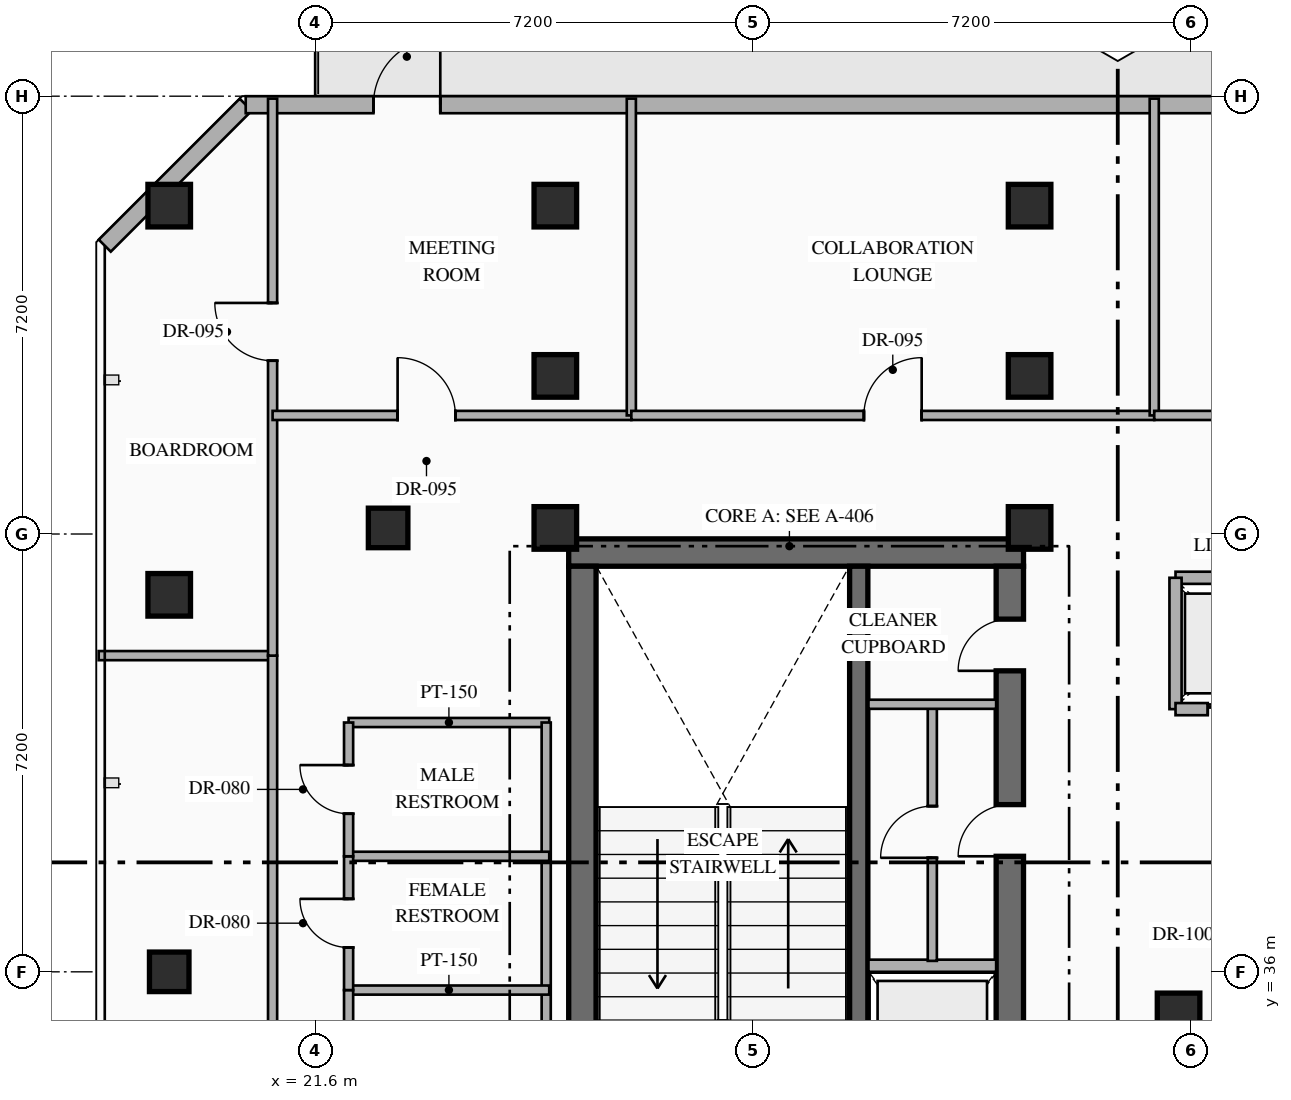
"""IFC4 building model, lengths in metres.
Left out: names, types, materials, properties, quantities, classifications, styles, units other than length and angle.
Written with IfcOpenShell. Run it as: python <this file> out.ifc"""

import sys

from ifc_helpers import new_model, si_unit, direction, frame, frame_2d, origin, origin_2d, place, context, subcontext, project, spatial, rectangle, hollow_rectangle, extrude, element, fill, save


model = new_model("IFC4")
c1 = context("Model", 3, precision=1e-05, world=origin(), true_north=direction((0.0, 1.0)))
c2 = subcontext(c1, "Body", "Model", "MODEL_VIEW")
j1 = project(units=[si_unit("LENGTHUNIT", "METRE"), si_unit("PLANEANGLEUNIT", "RADIAN")], contexts=[c1])
p1 = place(None, origin())
s1 = spatial("IfcSite", under=j1, at=p1, CompositionType="ELEMENT")
p2 = place(p1, origin())
s2 = spatial("IfcBuilding", under=s1, at=p2, CompositionType="ELEMENT")
p3 = place(p2, frame((0.0, 0.0, 231.15)))
s3 = spatial("IfcBuildingStorey", under=s2, at=p3, CompositionType="ELEMENT", Elevation=231.15)
p4 = place(p3, frame((25.77, 42.895, 0.0), z_axis=(0.0, 0.0, 1.0), x_axis=(1.0, 0.0, 0.0)))
e1 = element("IfcWall", 1, at=p4, inside=s3, PredefinedType="SHEAR", context=c2, shape_type="SweptSolid", body=[
    extrude(rectangle(XDim=7.48, YDim=0.45, at=frame_2d((3.74, 0.0))), origin(), (0.0, 0.0, 1.0), 3.6),
])
p5 = place(p3, frame((25.995, 33.19, 0.0), z_axis=(0.0, 0.0, 1.0), x_axis=(0.0, 1.0, 0.0)))
e2 = element("IfcWall", 2, at=p5, inside=s3, PredefinedType="SHEAR", context=c2, shape_type="SweptSolid", body=[
    extrude(rectangle(XDim=9.48, YDim=0.45, at=frame_2d((4.74, 0.0))), origin(), (0.0, 0.0, 1.0), 3.6),
])
p6 = place(p3, frame((33.025, 33.19, 0.0), z_axis=(0.0, 0.0, 1.0), x_axis=(0.0, 1.0, 0.0)))
e3 = element("IfcWall", 3, at=p6, inside=s3, PredefinedType="SHEAR", context=c2, shape_type="SweptSolid", body=[
    extrude(rectangle(XDim=9.48, YDim=0.45, at=frame_2d((4.74, 0.0))), origin(), (0.0, 0.0, 1.0), 3.6),
])
p7 = place(p6, frame((4.71, 0.0, 0.0)))
e4 = element("IfcOpeningElement", 4, at=p7, cuts=e3, PredefinedType="OPENING", context=c2, shape_type="SweptSolid", body=[
    extrude(rectangle(XDim=0.85, YDim=2.08, at=frame_2d((0.425, 1.04))), frame((0.0, 0.235, 0.0), z_axis=(0.0, -1.0, 0.0), x_axis=(1.0, 0.0, 0.0)), (0.0, 0.0, 1.0), 0.47),
])
p8 = place(p6, frame((7.76, 0.0, 0.0)))
e5 = element("IfcOpeningElement", 5, at=p8, cuts=e3, PredefinedType="OPENING", context=c2, shape_type="SweptSolid", body=[
    extrude(rectangle(XDim=0.85, YDim=2.08, at=frame_2d((0.425, 1.04))), frame((0.0, 0.235, 0.0), z_axis=(0.0, -1.0, 0.0), x_axis=(1.0, 0.0, 0.0)), (0.0, 0.0, 1.0), 0.47),
])
p9 = place(p3, frame((30.54, 33.19, 0.0), z_axis=(0.0, 0.0, 1.0), x_axis=(0.0, 1.0, 0.0)))
e6 = element("IfcWall", 6, at=p9, inside=s3, PredefinedType="SHEAR", context=c2, shape_type="SweptSolid", body=[
    extrude(rectangle(XDim=9.48, YDim=0.3, at=frame_2d((4.74, 0.0))), origin(), (0.0, 0.0, 1.0), 3.6),
])
for number, where, z_axis, x_axis in (
    (7, (25.55, 43.3, 0.0), (0.0, 0.0, 1.0), (1.0, 0.0, 0.0)),
    (8, (33.35, 43.3, 0.0), (0.0, 0.0, 1.0), (1.0, 0.0, 0.0)),
    (9, (35.8, 35.3, 0.0), (0.0, 0.0, 1.0), (1.0, 0.0, 0.0)),
    (10, (25.55, 45.8, 0.0), (0.0, 0.0, 1.0), (1.0, 0.0, 0.0)),
    (11, (33.35, 45.8, 0.0), (0.0, 0.0, 1.0), (1.0, 0.0, 0.0)),
    (12, (19.2, 48.6, 0.0), (0.0, 0.0, 1.0), (1.0, 0.0, 0.0)),
    (13, (25.55, 48.6, 0.0), (0.0, 0.0, 1.0), (1.0, 0.0, 0.0)),
    (14, (33.35, 48.6, 0.0), (0.0, 0.0, 1.0), (1.0, 0.0, 0.0)),
    (15, (19.2, 42.2, 0.0), (0.0, 0.0, 1.0), (1.0, 0.0, 0.0)),
):
    element("IfcColumn", number, at=place(p3, frame(where, z_axis=z_axis, x_axis=x_axis)), inside=s3, PredefinedType="COLUMN", context=c2, shape_type="SweptSolid", body=[
        extrude(hollow_rectangle(XDim=0.7, YDim=0.7, WallThickness=0.028, at=origin_2d()), origin(), (0.0, 0.0, 1.0), 3.6),
    ])
for number, where, z_axis, x_axis in (
    (16, (22.8, 43.3, 0.0), (0.0, 0.0, 1.0), (1.0, 0.0, 0.0)),
    (17, (19.2, 36.0, 0.0), (0.0, 0.0, 1.0), (1.0, 0.0, 0.0)),
):
    element("IfcColumn", number, at=place(p3, frame(where, z_axis=z_axis, x_axis=x_axis)), inside=s3, PredefinedType="COLUMN", context=c2, shape_type="SweptSolid", body=[
        extrude(hollow_rectangle(XDim=0.65, YDim=0.65, WallThickness=0.025, at=origin_2d()), origin(), (0.0, 0.0, 1.0), 3.6),
    ])
p10 = place(p3, frame((18.14, 47.942, 0.0), z_axis=(0.0, 0.0, 1.0), x_axis=(0.707106781187, 0.707106781187, 0.0)))
e18 = element("IfcWall", 18, at=p10, inside=s3, PredefinedType="STANDARD", context=c2, shape_type="SweptSolid", body=[
    extrude(rectangle(XDim=3.278, YDim=0.28, at=frame_2d((1.639, 0.0))), origin(), (0.0, 0.0, 1.0), 3.3),
])
p11 = place(p3, frame((20.458, 50.26, 0.0), z_axis=(0.0, 0.0, 1.0), x_axis=(1.0, 0.0, 0.0)))
e19 = element("IfcWall", 19, at=p11, inside=s3, PredefinedType="STANDARD", context=c2, shape_type="SweptSolid", body=[
    extrude(rectangle(XDim=22.084, YDim=0.28, at=frame_2d((11.042, 0.0))), origin(), (0.0, 0.0, 1.0), 3.3),
])
p12 = place(p11, frame((2.1, 0.0, 0.0)))
e20 = element("IfcOpeningElement", 20, at=p12, cuts=e19, PredefinedType="OPENING", context=c2, shape_type="SweptSolid", body=[
    extrude(rectangle(XDim=1.1, YDim=2.2, at=frame_2d((0.55, 1.1))), frame((0.0, 0.15, 0.0), z_axis=(0.0, -1.0, 0.0), x_axis=(1.0, 0.0, 0.0)), (0.0, 0.0, 1.0), 0.3),
])
p13 = place(p3, frame((30.7, 36.1, 0.0), z_axis=(0.0, 0.0, 1.0), x_axis=(1.0, 0.0, 0.0)))
e21 = element("IfcWall", 21, at=p13, inside=s3, PredefinedType="STANDARD", context=c2, shape_type="SweptSolid", body=[
    extrude(rectangle(XDim=2.1, YDim=0.2, at=frame_2d((1.05, 0.0))), origin(), (0.0, 0.0, 1.0), 3.3),
])
p14 = place(p3, frame((31.75, 36.18, 0.0), z_axis=(0.0, 0.0, 1.0), x_axis=(0.0, 1.0, 0.0)))
e22 = element("IfcWall", 22, at=p14, inside=s3, PredefinedType="PARTITIONING", context=c2, shape_type="SweptSolid", body=[
    extrude(rectangle(XDim=4.24, YDim=0.15, at=frame_2d((2.12, 0.0))), origin(), (0.0, 0.0, 1.0), 3.3),
])
p15 = place(p14, frame((1.695, 0.0, 0.0)))
e23 = element("IfcOpeningElement", 23, at=p15, cuts=e22, PredefinedType="OPENING", context=c2, shape_type="SweptSolid", body=[
    extrude(rectangle(XDim=0.85, YDim=2.08, at=frame_2d((0.425, 1.04))), frame((0.0, 0.085, 0.0), z_axis=(0.0, -1.0, 0.0), x_axis=(1.0, 0.0, 0.0)), (0.0, 0.0, 1.0), 0.17),
])
p16 = place(p3, frame((30.7, 40.4, 0.0), z_axis=(0.0, 0.0, 1.0), x_axis=(1.0, 0.0, 0.0)))
e24 = element("IfcWall", 24, at=p16, inside=s3, PredefinedType="PARTITIONING", context=c2, shape_type="SweptSolid", body=[
    extrude(rectangle(XDim=2.1, YDim=0.15, at=frame_2d((1.05, 0.0))), origin(), (0.0, 0.0, 1.0), 3.3),
])
p17 = place(p3, frame((35.75, 42.48, 0.0), z_axis=(0.0, 0.0, 1.0), x_axis=(1.0, 0.0, 0.0)))
e25 = element("IfcWall", 25, at=p17, inside=s3, PredefinedType="STANDARD", context=c2, shape_type="SweptSolid", body=[
    extrude(rectangle(XDim=9.11, YDim=0.2, at=frame_2d((4.555, 0.0))), origin(), (0.0, 0.0, 1.0), 3.3),
])
p18 = place(p3, frame((35.75, 40.32, 0.0), z_axis=(0.0, 0.0, 1.0), x_axis=(0.0, 1.0, 0.0)))
e26 = element("IfcWall", 26, at=p18, inside=s3, PredefinedType="STANDARD", context=c2, shape_type="SweptSolid", body=[
    extrude(rectangle(XDim=2.16, YDim=0.2, at=frame_2d((1.08, 0.0))), origin(), (0.0, 0.0, 1.0), 3.3),
])
p19 = place(p3, frame((35.75, 40.32, 0.0), z_axis=(0.0, 0.0, 1.0), x_axis=(1.0, 0.0, 0.0)))
e27 = element("IfcWall", 27, at=p19, inside=s3, PredefinedType="STANDARD", context=c2, shape_type="SweptSolid", body=[
    extrude(rectangle(XDim=9.11, YDim=0.2, at=frame_2d((4.555, 0.0))), origin(), (0.0, 0.0, 1.0), 3.3),
])
p20 = place(p19, frame((0.53, 0.0, 0.0)))
e28 = element("IfcOpeningElement", 28, at=p20, cuts=e27, PredefinedType="OPENING", context=c2, shape_type="SweptSolid", body=[
    extrude(rectangle(XDim=1.1, YDim=2.18, at=frame_2d((0.55, 1.09))), frame((0.0, 0.11, 0.0), z_axis=(0.0, -1.0, 0.0), x_axis=(1.0, 0.0, 0.0)), (0.0, 0.0, 1.0), 0.22),
])
p21 = place(p19, frame((2.73, 0.0, 0.0)))
e29 = element("IfcOpeningElement", 29, at=p21, cuts=e27, PredefinedType="OPENING", context=c2, shape_type="SweptSolid", body=[
    extrude(rectangle(XDim=1.1, YDim=2.18, at=frame_2d((0.55, 1.09))), frame((0.0, 0.11, 0.0), z_axis=(0.0, -1.0, 0.0), x_axis=(1.0, 0.0, 0.0)), (0.0, 0.0, 1.0), 0.22),
])
p22 = place(p19, frame((4.93, 0.0, 0.0)))
e30 = element("IfcOpeningElement", 30, at=p22, cuts=e27, PredefinedType="OPENING", context=c2, shape_type="SweptSolid", body=[
    extrude(rectangle(XDim=1.1, YDim=2.18, at=frame_2d((0.55, 1.09))), frame((0.0, 0.11, 0.0), z_axis=(0.0, -1.0, 0.0), x_axis=(1.0, 0.0, 0.0)), (0.0, 0.0, 1.0), 0.22),
])
p23 = place(p19, frame((7.13, 0.0, 0.0)))
e31 = element("IfcOpeningElement", 31, at=p23, cuts=e27, PredefinedType="OPENING", context=c2, shape_type="SweptSolid", body=[
    extrude(rectangle(XDim=1.1, YDim=2.18, at=frame_2d((0.55, 1.09))), frame((0.0, 0.11, 0.0), z_axis=(0.0, -1.0, 0.0), x_axis=(1.0, 0.0, 0.0)), (0.0, 0.0, 1.0), 0.22),
])
p24 = place(p3, frame((22.15, 40.1, 0.0), z_axis=(0.0, 0.0, 1.0), x_axis=(1.0, 0.0, 0.0)))
e32 = element("IfcWall", 32, at=p24, inside=s3, PredefinedType="PARTITIONING", context=c2, shape_type="SweptSolid", body=[
    extrude(rectangle(XDim=3.3, YDim=0.15, at=frame_2d((1.65, 0.0))), origin(), (0.0, 0.0, 1.0), 3.3),
])
p25 = place(p3, frame((25.4, 33.5, 0.0), z_axis=(0.0, 0.0, 1.0), x_axis=(0.0, 1.0, 0.0)))
e33 = element("IfcWall", 33, at=p25, inside=s3, PredefinedType="PARTITIONING", context=c2, shape_type="SweptSolid", body=[
    extrude(rectangle(XDim=6.6, YDim=0.15, at=frame_2d((3.3, 0.0))), origin(), (0.0, 0.0, 1.0), 3.3),
])
for number, where, z_axis, x_axis in (
    (34, (22.15, 35.7, 0.0), (0.0, 0.0, 1.0), (1.0, 0.0, 0.0)),
    (35, (22.15, 37.9, 0.0), (0.0, 0.0, 1.0), (1.0, 0.0, 0.0)),
):
    element("IfcWall", number, at=place(p3, frame(where, z_axis=z_axis, x_axis=x_axis)), inside=s3, PredefinedType="PARTITIONING", context=c2, shape_type="SweptSolid", body=[
        extrude(rectangle(XDim=3.3, YDim=0.15, at=frame_2d((1.65, 0.0))), origin(), (0.0, 0.0, 1.0), 3.3),
    ])
p26 = place(p3, frame((22.15, 33.5, 0.0), z_axis=(0.0, 0.0, 1.0), x_axis=(0.0, 1.0, 0.0)))
e36 = element("IfcWall", 36, at=p26, inside=s3, PredefinedType="PARTITIONING", context=c2, shape_type="SweptSolid", body=[
    extrude(rectangle(XDim=2.2, YDim=0.15, at=frame_2d((1.1, 0.0))), origin(), (0.0, 0.0, 1.0), 3.3),
])
p27 = place(p26, frame((0.7, 0.0, 0.0)))
e37 = element("IfcOpeningElement", 37, at=p27, cuts=e36, PredefinedType="OPENING", context=c2, shape_type="SweptSolid", body=[
    extrude(rectangle(XDim=0.8, YDim=2.06, at=frame_2d((0.4, 1.03))), frame((0.0, 0.085, 0.0), z_axis=(0.0, -1.0, 0.0), x_axis=(1.0, 0.0, 0.0)), (0.0, 0.0, 1.0), 0.17),
])
p28 = place(p3, frame((22.15, 35.7, 0.0), z_axis=(0.0, 0.0, 1.0), x_axis=(0.0, 1.0, 0.0)))
e38 = element("IfcWall", 38, at=p28, inside=s3, PredefinedType="PARTITIONING", context=c2, shape_type="SweptSolid", body=[
    extrude(rectangle(XDim=2.2, YDim=0.15, at=frame_2d((1.1, 0.0))), origin(), (0.0, 0.0, 1.0), 3.3),
])
p29 = place(p28, frame((0.7, 0.0, 0.0)))
e39 = element("IfcOpeningElement", 39, at=p29, cuts=e38, PredefinedType="OPENING", context=c2, shape_type="SweptSolid", body=[
    extrude(rectangle(XDim=0.8, YDim=2.06, at=frame_2d((0.4, 1.03))), frame((0.0, 0.085, 0.0), z_axis=(0.0, -1.0, 0.0), x_axis=(1.0, 0.0, 0.0)), (0.0, 0.0, 1.0), 0.17),
])
p30 = place(p3, frame((22.15, 37.9, 0.0), z_axis=(0.0, 0.0, 1.0), x_axis=(0.0, 1.0, 0.0)))
e40 = element("IfcWall", 40, at=p30, inside=s3, PredefinedType="PARTITIONING", context=c2, shape_type="SweptSolid", body=[
    extrude(rectangle(XDim=2.2, YDim=0.15, at=frame_2d((1.1, 0.0))), origin(), (0.0, 0.0, 1.0), 3.3),
])
p31 = place(p30, frame((0.7, 0.0, 0.0)))
e41 = element("IfcOpeningElement", 41, at=p31, cuts=e40, PredefinedType="OPENING", context=c2, shape_type="SweptSolid", body=[
    extrude(rectangle(XDim=0.8, YDim=2.06, at=frame_2d((0.4, 1.03))), frame((0.0, 0.085, 0.0), z_axis=(0.0, -1.0, 0.0), x_axis=(1.0, 0.0, 0.0)), (0.0, 0.0, 1.0), 0.17),
])
p32 = place(p3, frame((18.04, 41.2, 0.0), z_axis=(0.0, 0.0, 1.0), x_axis=(1.0, 0.0, 0.0)))
e42 = element("IfcWall", 42, at=p32, inside=s3, PredefinedType="PARTITIONING", context=c2, shape_type="SweptSolid", body=[
    extrude(rectangle(XDim=2.86, YDim=0.15, at=frame_2d((1.43, 0.0))), origin(), (0.0, 0.0, 1.0), 3.3),
])
p33 = place(p3, frame((20.9, 31.8, 0.0), z_axis=(0.0, 0.0, 1.0), x_axis=(0.0, 1.0, 0.0)))
e43 = element("IfcWall", 43, at=p33, inside=s3, PredefinedType="PARTITIONING", context=c2, shape_type="SweptSolid", body=[
    extrude(rectangle(XDim=9.4, YDim=0.15, at=frame_2d((4.7, 0.0))), origin(), (0.0, 0.0, 1.0), 3.3),
])
p34 = place(p33, frame((0.38, 0.0, 0.0)))
e44 = element("IfcOpeningElement", 44, at=p34, cuts=e43, PredefinedType="OPENING", context=c2, shape_type="SweptSolid", body=[
    extrude(rectangle(XDim=0.95, YDim=2.15, at=frame_2d((0.475, 1.075))), frame((0.0, 0.085, 0.0), z_axis=(0.0, -1.0, 0.0), x_axis=(1.0, 0.0, 0.0)), (0.0, 0.0, 1.0), 0.17),
])
p35 = place(p3, frame((20.9, 41.2, 0.0), z_axis=(0.0, 0.0, 1.0), x_axis=(0.0, 1.0, 0.0)))
e45 = element("IfcWall", 45, at=p35, inside=s3, PredefinedType="PARTITIONING", context=c2, shape_type="SweptSolid", body=[
    extrude(rectangle(XDim=9.16, YDim=0.15, at=frame_2d((4.58, 0.0))), origin(), (0.0, 0.0, 1.0), 3.3),
])
p36 = place(p35, frame((4.85, 0.0, 0.0)))
e46 = element("IfcOpeningElement", 46, at=p36, cuts=e45, PredefinedType="OPENING", context=c2, shape_type="SweptSolid", body=[
    extrude(rectangle(XDim=0.95, YDim=2.15, at=frame_2d((0.475, 1.075))), frame((0.0, 0.085, 0.0), z_axis=(0.0, -1.0, 0.0), x_axis=(1.0, 0.0, 0.0)), (0.0, 0.0, 1.0), 0.17),
])
p37 = place(p3, frame((20.9, 45.15, 0.0), z_axis=(0.0, 0.0, 1.0), x_axis=(1.0, 0.0, 0.0)))
e47 = element("IfcWall", 47, at=p37, inside=s3, PredefinedType="PARTITIONING", context=c2, shape_type="SweptSolid", body=[
    extrude(rectangle(XDim=5.9, YDim=0.15, at=frame_2d((2.95, 0.0))), origin(), (0.0, 0.0, 1.0), 3.3),
])
p38 = place(p37, frame((2.056, 0.0, 0.0)))
e48 = element("IfcOpeningElement", 48, at=p38, cuts=e47, PredefinedType="OPENING", context=c2, shape_type="SweptSolid", body=[
    extrude(rectangle(XDim=0.95, YDim=2.15, at=frame_2d((0.475, 1.075))), frame((0.0, 0.085, 0.0), z_axis=(0.0, -1.0, 0.0), x_axis=(1.0, 0.0, 0.0)), (0.0, 0.0, 1.0), 0.17),
])
p39 = place(p3, frame((26.8, 45.15, 0.0), z_axis=(0.0, 0.0, 1.0), x_axis=(0.0, 1.0, 0.0)))
e49 = element("IfcWall", 49, at=p39, inside=s3, PredefinedType="PARTITIONING", context=c2, shape_type="SweptSolid", body=[
    extrude(rectangle(XDim=5.21, YDim=0.15, at=frame_2d((2.605, 0.0))), origin(), (0.0, 0.0, 1.0), 3.3),
])
p40 = place(p3, frame((26.8, 45.15, 0.0), z_axis=(0.0, 0.0, 1.0), x_axis=(1.0, 0.0, 0.0)))
e50 = element("IfcWall", 50, at=p40, inside=s3, PredefinedType="PARTITIONING", context=c2, shape_type="SweptSolid", body=[
    extrude(rectangle(XDim=8.6, YDim=0.15, at=frame_2d((4.3, 0.0))), origin(), (0.0, 0.0, 1.0), 3.3),
])
p41 = place(p40, frame((3.825, 0.0, 0.0)))
e51 = element("IfcOpeningElement", 51, at=p41, cuts=e50, PredefinedType="OPENING", context=c2, shape_type="SweptSolid", body=[
    extrude(rectangle(XDim=0.95, YDim=2.15, at=frame_2d((0.475, 1.075))), frame((0.0, 0.085, 0.0), z_axis=(0.0, -1.0, 0.0), x_axis=(1.0, 0.0, 0.0)), (0.0, 0.0, 1.0), 0.17),
])
p42 = place(p3, frame((35.4, 45.15, 0.0), z_axis=(0.0, 0.0, 1.0), x_axis=(0.0, 1.0, 0.0)))
e52 = element("IfcWall", 52, at=p42, inside=s3, PredefinedType="PARTITIONING", context=c2, shape_type="SweptSolid", body=[
    extrude(rectangle(XDim=5.21, YDim=0.15, at=frame_2d((2.605, 0.0))), origin(), (0.0, 0.0, 1.0), 3.3),
])
p43 = place(p3, frame((35.4, 45.15, 0.0), z_axis=(0.0, 0.0, 1.0), x_axis=(1.0, 0.0, 0.0)))
e53 = element("IfcWall", 53, at=p43, inside=s3, PredefinedType="PARTITIONING", context=c2, shape_type="SweptSolid", body=[
    extrude(rectangle(XDim=9.56, YDim=0.15, at=frame_2d((4.78, 0.0))), origin(), (0.0, 0.0, 1.0), 3.3),
])
p44 = place(p43, frame((4.305, 0.0, 0.0)))
e54 = element("IfcOpeningElement", 54, at=p44, cuts=e53, PredefinedType="OPENING", context=c2, shape_type="SweptSolid", body=[
    extrude(rectangle(XDim=0.95, YDim=2.15, at=frame_2d((0.475, 1.075))), frame((0.0, 0.085, 0.0), z_axis=(0.0, -1.0, 0.0), x_axis=(1.0, 0.0, 0.0)), (0.0, 0.0, 1.0), 0.17),
])
p45 = place(p12, origin())
e55 = element("IfcDoor", 55, at=p45, inside=s3, OperationType="SINGLE_SWING_RIGHT", PredefinedType="DOOR", context=c2, shape_type="SweptSolid", body=[
    extrude(rectangle(XDim=1.1, YDim=2.2, at=frame_2d((0.55, 1.1))), frame((0.0, 0.025, 0.0), z_axis=(0.0, -1.0, 0.0), x_axis=(1.0, 0.0, 0.0)), (0.0, 0.0, 1.0), 0.05),
])
fill(e20, e55)
p46 = place(p7, origin())
e56 = element("IfcDoor", 56, at=p46, inside=s3, OperationType="SINGLE_SWING_LEFT", PredefinedType="DOOR", context=c2, shape_type="SweptSolid", body=[
    extrude(rectangle(XDim=0.85, YDim=2.08, at=frame_2d((0.425, 1.04))), frame((0.0, 0.025, 0.0), z_axis=(0.0, -1.0, 0.0), x_axis=(1.0, 0.0, 0.0)), (0.0, 0.0, 1.0), 0.05),
])
fill(e4, e56)
p47 = place(p8, origin())
e57 = element("IfcDoor", 57, at=p47, inside=s3, OperationType="SINGLE_SWING_LEFT", PredefinedType="DOOR", context=c2, shape_type="SweptSolid", body=[
    extrude(rectangle(XDim=0.85, YDim=2.08, at=frame_2d((0.425, 1.04))), frame((0.0, 0.025, 0.0), z_axis=(0.0, -1.0, 0.0), x_axis=(1.0, 0.0, 0.0)), (0.0, 0.0, 1.0), 0.05),
])
fill(e5, e57)
p48 = place(p15, origin())
e58 = element("IfcDoor", 58, at=p48, inside=s3, OperationType="SINGLE_SWING_LEFT", PredefinedType="DOOR", context=c2, shape_type="SweptSolid", body=[
    extrude(rectangle(XDim=0.85, YDim=2.08, at=frame_2d((0.425, 1.04))), frame((0.0, 0.025, 0.0), z_axis=(0.0, -1.0, 0.0), x_axis=(1.0, 0.0, 0.0)), (0.0, 0.0, 1.0), 0.05),
])
fill(e23, e58)
p49 = place(p20, origin())
e59 = element("IfcDoor", 59, at=p49, inside=s3, OperationType="SLIDING_TO_RIGHT", PredefinedType="USERDEFINED", context=c2, shape_type="SweptSolid", body=[
    extrude(rectangle(XDim=1.1, YDim=2.18, at=frame_2d((0.55, 1.09))), frame((0.0, 0.025, 0.0), z_axis=(0.0, -1.0, 0.0), x_axis=(1.0, 0.0, 0.0)), (0.0, 0.0, 1.0), 0.05),
])
fill(e28, e59)
p50 = place(p29, origin())
e60 = element("IfcDoor", 60, at=p50, inside=s3, OperationType="SINGLE_SWING_RIGHT", PredefinedType="DOOR", context=c2, shape_type="SweptSolid", body=[
    extrude(rectangle(XDim=0.8, YDim=2.06, at=frame_2d((0.4, 1.03))), frame((0.0, 0.025, 0.0), z_axis=(0.0, -1.0, 0.0), x_axis=(1.0, 0.0, 0.0)), (0.0, 0.0, 1.0), 0.05),
])
fill(e39, e60)
p51 = place(p31, origin())
e61 = element("IfcDoor", 61, at=p51, inside=s3, OperationType="SINGLE_SWING_RIGHT", PredefinedType="DOOR", context=c2, shape_type="SweptSolid", body=[
    extrude(rectangle(XDim=0.8, YDim=2.06, at=frame_2d((0.4, 1.03))), frame((0.0, 0.025, 0.0), z_axis=(0.0, -1.0, 0.0), x_axis=(1.0, 0.0, 0.0)), (0.0, 0.0, 1.0), 0.05),
])
fill(e41, e61)
p52 = place(p36, origin())
e62 = element("IfcDoor", 62, at=p52, inside=s3, OperationType="SINGLE_SWING_RIGHT", PredefinedType="DOOR", context=c2, shape_type="SweptSolid", body=[
    extrude(rectangle(XDim=0.95, YDim=2.15, at=frame_2d((0.475, 1.075))), frame((0.0, 0.025, 0.0), z_axis=(0.0, -1.0, 0.0), x_axis=(1.0, 0.0, 0.0)), (0.0, 0.0, 1.0), 0.05),
])
fill(e46, e62)
p53 = place(p38, origin())
e63 = element("IfcDoor", 63, at=p53, inside=s3, OperationType="SINGLE_SWING_LEFT", PredefinedType="DOOR", context=c2, shape_type="SweptSolid", body=[
    extrude(rectangle(XDim=0.95, YDim=2.15, at=frame_2d((0.475, 1.075))), frame((0.0, 0.025, 0.0), z_axis=(0.0, -1.0, 0.0), x_axis=(1.0, 0.0, 0.0)), (0.0, 0.0, 1.0), 0.05),
])
fill(e48, e63)
p54 = place(p41, origin())
e64 = element("IfcDoor", 64, at=p54, inside=s3, OperationType="SINGLE_SWING_RIGHT", PredefinedType="DOOR", context=c2, shape_type="SweptSolid", body=[
    extrude(rectangle(XDim=0.95, YDim=2.15, at=frame_2d((0.475, 1.075))), frame((0.0, 0.025, 0.0), z_axis=(0.0, -1.0, 0.0), x_axis=(1.0, 0.0, 0.0)), (0.0, 0.0, 1.0), 0.05),
])
fill(e51, e64)
save(model, sys.argv[1])
